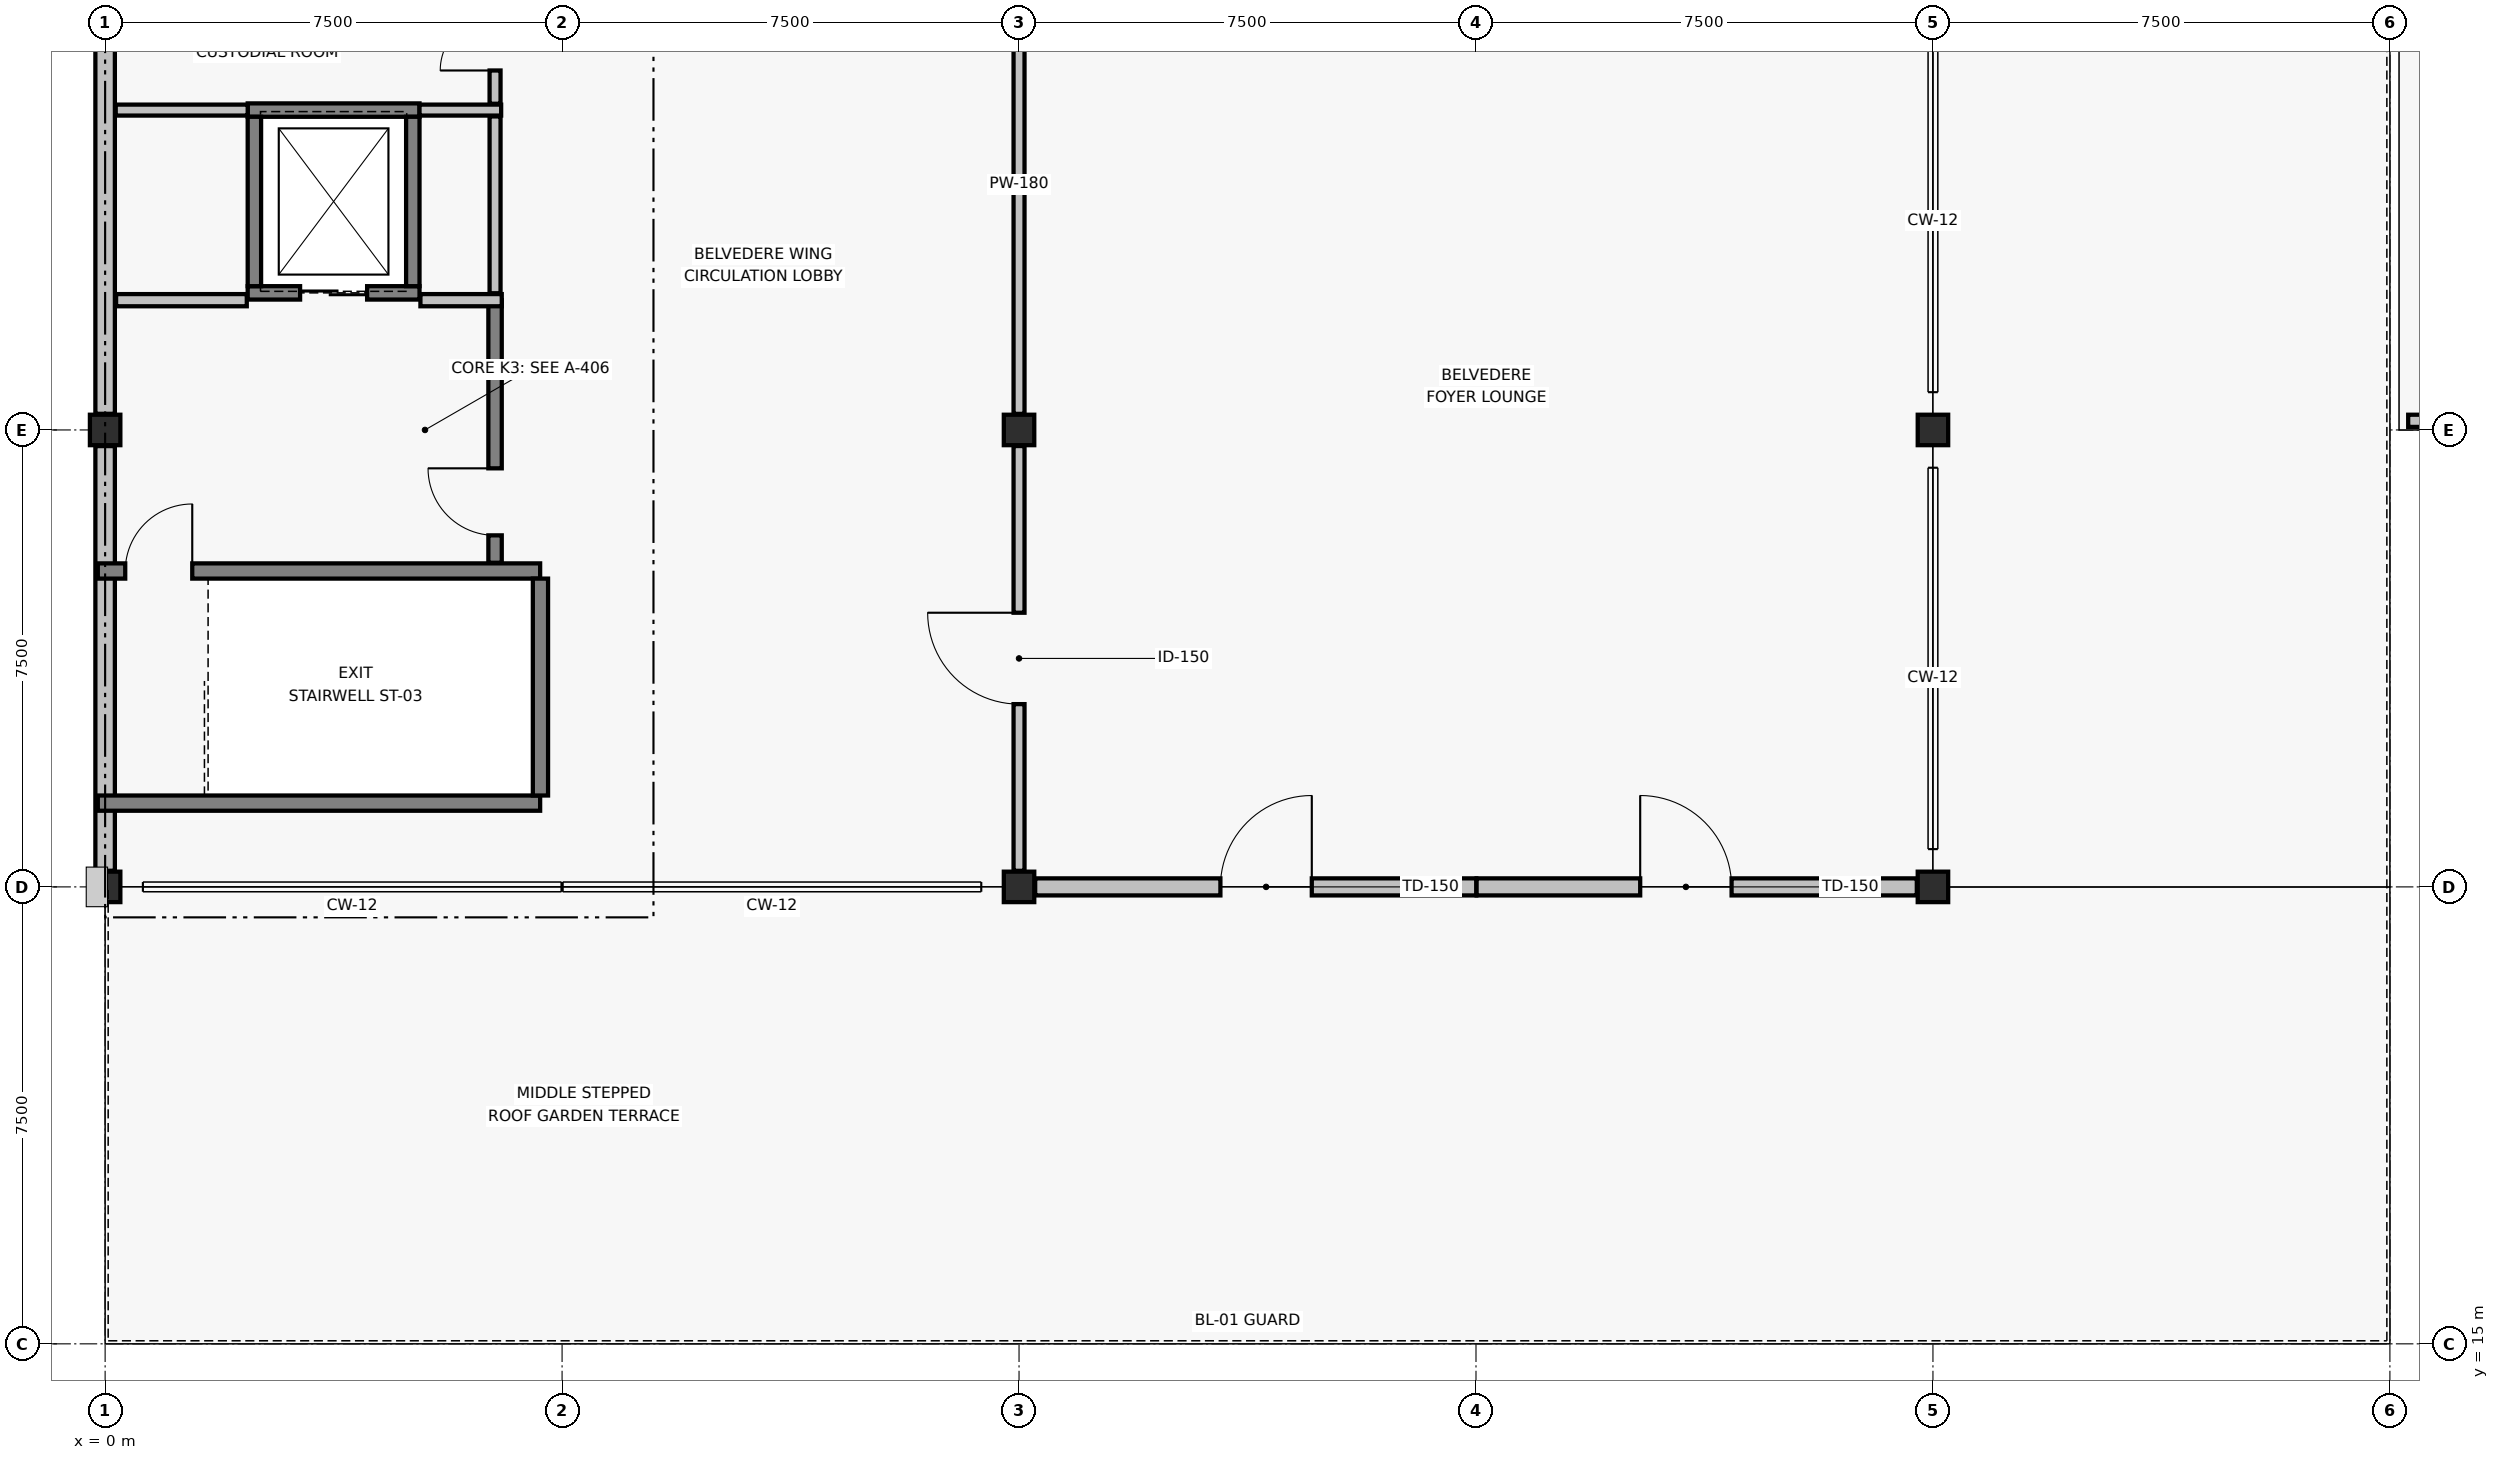
"""IFC4 building model, lengths in metres.
Left out: names, types, materials, properties, quantities, classifications, styles, units other than length and angle.
Written with IfcOpenShell. Run it as: python <this file> out.ifc"""

import sys

from ifc_helpers import new_model, si_unit, direction, frame, frame_2d, origin, origin_2d, place, context, subcontext, project, spatial, rectangle, extrude, element, fill, save


model = new_model("IFC4")
c1 = context("Model", 3, precision=1e-05, world=origin(), true_north=direction((0.0, 1.0)))
c2 = subcontext(c1, "Body", "Model", "MODEL_VIEW")
j1 = project(units=[si_unit("LENGTHUNIT", "METRE"), si_unit("PLANEANGLEUNIT", "RADIAN")], contexts=[c1])
p1 = place(None, origin())
s1 = spatial("IfcSite", under=j1, at=p1, CompositionType="ELEMENT")
p2 = place(p1, origin())
s2 = spatial("IfcBuilding", under=s1, at=p2, CompositionType="ELEMENT")
p3 = place(p2, frame((0.0, 0.0, 17.1)))
s3 = spatial("IfcBuildingStorey", under=s2, at=p3, CompositionType="ELEMENT", Elevation=17.1)
for number, where, z_axis, x_axis in (
    (1, (0.0, 22.5, 0.0), (0.0, 0.0, 1.0), (1.0, 0.0, 0.0)),
    (2, (0.0, 30.0, 0.0), (0.0, 0.0, 1.0), (1.0, 0.0, 0.0)),
    (3, (15.0, 22.5, 0.0), (0.0, 0.0, 1.0), (1.0, 0.0, 0.0)),
    (4, (15.0, 30.0, 0.0), (0.0, 0.0, 1.0), (1.0, 0.0, 0.0)),
    (5, (30.0, 22.5, 0.0), (0.0, 0.0, 1.0), (1.0, 0.0, 0.0)),
    (6, (30.0, 30.0, 0.0), (0.0, 0.0, 1.0), (1.0, 0.0, 0.0)),
):
    element("IfcColumn", number, at=place(p3, frame(where, z_axis=z_axis, x_axis=x_axis)), inside=s3, PredefinedType="COLUMN", context=c2, shape_type="SweptSolid", body=[
        extrude(rectangle(XDim=0.5, YDim=0.5, at=origin_2d()), origin(), (0.0, 0.0, 1.0), 3.9),
    ])
p4 = place(p3, frame((15.265, 22.5, 0.0), z_axis=(0.0, 0.0, 1.0), x_axis=(1.0, 0.0, 0.0)))
e7 = element("IfcWall", 7, at=p4, inside=s3, PredefinedType="SOLIDWALL", context=c2, shape_type="SweptSolid", body=[
    extrude(rectangle(XDim=7.24, YDim=0.28, at=frame_2d((3.62, 0.0))), origin(), (0.0, 0.0, 1.0), 2.59),
])
p5 = place(p4, frame((3.04, 0.0, 0.0)))
e8 = element("IfcOpeningElement", 8, at=p5, cuts=e7, PredefinedType="OPENING", context=c2, shape_type="SweptSolid", body=[
    extrude(rectangle(XDim=1.5, YDim=2.15, at=frame_2d((0.75, 1.075))), frame((0.0, 0.15, 0.0), z_axis=(0.0, -1.0, 0.0), x_axis=(1.0, 0.0, 0.0)), (0.0, 0.0, 1.0), 0.3),
])
p6 = place(p3, frame((22.51, 22.5, 0.0), z_axis=(0.0, 0.0, 1.0), x_axis=(1.0, 0.0, 0.0)))
e9 = element("IfcWall", 9, at=p6, inside=s3, PredefinedType="SOLIDWALL", context=c2, shape_type="SweptSolid", body=[
    extrude(rectangle(XDim=7.225, YDim=0.28, at=frame_2d((3.613, 0.0))), origin(), (0.0, 0.0, 1.0), 2.59),
])
p7 = place(p6, frame((2.685, 0.0, 0.0)))
e10 = element("IfcOpeningElement", 10, at=p7, cuts=e9, PredefinedType="OPENING", context=c2, shape_type="SweptSolid", body=[
    extrude(rectangle(XDim=1.5, YDim=2.15, at=frame_2d((0.75, 1.075))), frame((0.0, 0.15, 0.0), z_axis=(0.0, -1.0, 0.0), x_axis=(1.0, 0.0, 0.0)), (0.0, 0.0, 1.0), 0.3),
])
for number, where, z_axis, x_axis in (
    (11, (0.0, 22.765, 0.0), (0.0, 0.0, 1.0), (0.0, 1.0, 0.0)),
    (12, (0.0, 30.265, 0.0), (0.0, 0.0, 1.0), (0.0, 1.0, 0.0)),
):
    element("IfcWall", number, at=place(p3, frame(where, z_axis=z_axis, x_axis=x_axis)), inside=s3, PredefinedType="SOLIDWALL", context=c2, shape_type="SweptSolid", body=[
        extrude(rectangle(XDim=6.97, YDim=0.32, at=frame_2d((3.485, 0.0))), origin(), (0.0, 0.0, 1.0), 2.59),
    ])
p8 = place(p3, frame((37.8, 30.15, 0.55), z_axis=(0.0, 0.0, 1.0), x_axis=(1.0, 0.0, 0.0)))
e13 = element("IfcWall", 13, at=p8, inside=s3, PredefinedType="PARAPET", context=c2, shape_type="SweptSolid", body=[
    extrude(rectangle(XDim=14.4, YDim=0.2, at=frame_2d((7.2, 0.0))), origin(), (0.0, 0.0, 1.0), 1.12),
])
p9 = place(p3, frame((-0.12, 23.875, 0.0), z_axis=(0.0, 0.0, 1.0), x_axis=(1.0, 0.0, 0.0)))
e14 = element("IfcWall", 14, at=p9, inside=s3, PredefinedType="SOLIDWALL", context=c2, shape_type="SweptSolid", body=[
    extrude(rectangle(XDim=7.26, YDim=0.25, at=frame_2d((3.63, 0.0))), origin(), (0.0, 0.0, 1.0), 3.62),
])
p10 = place(p3, frame((-0.12, 27.685, 0.0), z_axis=(0.0, 0.0, 1.0), x_axis=(1.0, 0.0, 0.0)))
e15 = element("IfcWall", 15, at=p10, inside=s3, PredefinedType="SOLIDWALL", context=c2, shape_type="SweptSolid", body=[
    extrude(rectangle(XDim=7.26, YDim=0.25, at=frame_2d((3.63, 0.0))), origin(), (0.0, 0.0, 1.0), 3.62),
])
p11 = place(p10, frame((0.45, 0.0, 0.0)))
e16 = element("IfcOpeningElement", 16, at=p11, cuts=e15, PredefinedType="OPENING", context=c2, shape_type="SweptSolid", body=[
    extrude(rectangle(XDim=1.1, YDim=2.15, at=frame_2d((0.55, 1.075))), frame((0.0, 0.135, 0.0), z_axis=(0.0, -1.0, 0.0), x_axis=(1.0, 0.0, 0.0)), (0.0, 0.0, 1.0), 0.27),
])
p12 = place(p3, frame((7.145, 24.0, 0.0), z_axis=(0.0, 0.0, 1.0), x_axis=(0.0, 1.0, 0.0)))
e17 = element("IfcWall", 17, at=p12, inside=s3, PredefinedType="SOLIDWALL", context=c2, shape_type="SweptSolid", body=[
    extrude(rectangle(XDim=3.56, YDim=0.25, at=frame_2d((1.78, 0.0))), origin(), (0.0, 0.0, 1.0), 3.62),
])
p13 = place(p3, frame((2.34, 32.25, 0.0), z_axis=(0.0, 0.0, 1.0), x_axis=(1.0, 0.0, 0.0)))
e18 = element("IfcWall", 18, at=p13, inside=s3, PredefinedType="SOLIDWALL", context=c2, shape_type="SweptSolid", body=[
    extrude(rectangle(XDim=2.82, YDim=0.22, at=frame_2d((1.41, 0.0))), origin(), (0.0, 0.0, 1.0), 3.62),
])
p14 = place(p13, frame((0.86, 0.0, 0.0)))
e19 = element("IfcOpeningElement", 19, at=p14, cuts=e18, PredefinedType="OPENING", context=c2, shape_type="SweptSolid", body=[
    extrude(rectangle(XDim=1.1, YDim=2.15, at=frame_2d((0.55, 1.075))), frame((0.0, 0.12, 0.0), z_axis=(0.0, -1.0, 0.0), x_axis=(1.0, 0.0, 0.0)), (0.0, 0.0, 1.0), 0.24),
])
p15 = place(p3, frame((2.34, 35.25, 0.0), z_axis=(0.0, 0.0, 1.0), x_axis=(1.0, 0.0, 0.0)))
e20 = element("IfcWall", 20, at=p15, inside=s3, PredefinedType="SOLIDWALL", context=c2, shape_type="SweptSolid", body=[
    extrude(rectangle(XDim=2.82, YDim=0.22, at=frame_2d((1.41, 0.0))), origin(), (0.0, 0.0, 1.0), 3.62),
])
for number, where, z_axis, x_axis in (
    (21, (2.45, 32.36, 0.0), (0.0, 0.0, 1.0), (0.0, 1.0, 0.0)),
    (22, (5.05, 32.36, 0.0), (0.0, 0.0, 1.0), (0.0, 1.0, 0.0)),
):
    element("IfcWall", number, at=place(p3, frame(where, z_axis=z_axis, x_axis=x_axis)), inside=s3, PredefinedType="SOLIDWALL", context=c2, shape_type="SweptSolid", body=[
        extrude(rectangle(XDim=2.78, YDim=0.22, at=frame_2d((1.39, 0.0))), origin(), (0.0, 0.0, 1.0), 3.62),
    ])
p16 = place(p3, frame((6.4, 27.82, 0.0), z_axis=(0.0, 0.0, 1.0), x_axis=(0.0, 1.0, 0.0)))
e23 = element("IfcWall", 23, at=p16, inside=s3, PredefinedType="SOLIDWALL", context=c2, shape_type="SweptSolid", body=[
    extrude(rectangle(XDim=4.31, YDim=0.22, at=frame_2d((2.155, 0.0))), origin(), (0.0, 0.0, 1.0), 3.62),
])
p17 = place(p16, frame((0.45, 0.0, 0.0)))
e24 = element("IfcOpeningElement", 24, at=p17, cuts=e23, PredefinedType="OPENING", context=c2, shape_type="SweptSolid", body=[
    extrude(rectangle(XDim=1.1, YDim=2.15, at=frame_2d((0.55, 1.075))), frame((0.0, 0.12, 0.0), z_axis=(0.0, -1.0, 0.0), x_axis=(1.0, 0.0, 0.0)), (0.0, 0.0, 1.0), 0.24),
])
p18 = place(p3, frame((0.18, 32.13, 0.0), z_axis=(0.0, 0.0, 1.0), x_axis=(1.0, 0.0, 0.0)))
e25 = element("IfcWall", 25, at=p18, inside=s3, PredefinedType="PARTITIONING", context=c2, shape_type="SweptSolid", body=[
    extrude(rectangle(XDim=2.145, YDim=0.2, at=frame_2d((1.073, 0.0))), origin(), (0.0, 0.0, 1.0), 3.0),
])
p19 = place(p3, frame((5.175, 32.13, 0.0), z_axis=(0.0, 0.0, 1.0), x_axis=(1.0, 0.0, 0.0)))
e26 = element("IfcWall", 26, at=p19, inside=s3, PredefinedType="PARTITIONING", context=c2, shape_type="SweptSolid", body=[
    extrude(rectangle(XDim=1.335, YDim=0.2, at=frame_2d((0.667, 0.0))), origin(), (0.0, 0.0, 1.0), 3.33),
])
p20 = place(p3, frame((0.174, 35.25, 0.0), z_axis=(0.0, 0.0, 1.0), x_axis=(1.0, 0.0, 0.0)))
e27 = element("IfcWall", 27, at=p20, inside=s3, PredefinedType="PARTITIONING", context=c2, shape_type="SweptSolid", body=[
    extrude(rectangle(XDim=2.166, YDim=0.18, at=frame_2d((1.083, 0.0))), origin(), (0.0, 0.0, 1.0), 2.97),
])
p21 = place(p3, frame((5.16, 35.25, 0.0), z_axis=(0.0, 0.0, 1.0), x_axis=(1.0, 0.0, 0.0)))
e28 = element("IfcWall", 28, at=p21, inside=s3, PredefinedType="PARTITIONING", context=c2, shape_type="SweptSolid", body=[
    extrude(rectangle(XDim=1.34, YDim=0.18, at=frame_2d((0.67, 0.0))), origin(), (0.0, 0.0, 1.0), 2.97),
])
p22 = place(p3, frame((6.4, 32.244, 0.0), z_axis=(0.0, 0.0, 1.0), x_axis=(0.0, 1.0, 0.0)))
e29 = element("IfcWall", 29, at=p22, inside=s3, PredefinedType="PARTITIONING", context=c2, shape_type="SweptSolid", body=[
    extrude(rectangle(XDim=2.902, YDim=0.18, at=frame_2d((1.451, 0.0))), origin(), (0.0, 0.0, 1.0), 2.97),
])
p23 = place(p3, frame((6.4, 35.354, 0.0), z_axis=(0.0, 0.0, 1.0), x_axis=(0.0, 1.0, 0.0)))
e30 = element("IfcWall", 30, at=p23, inside=s3, PredefinedType="PARTITIONING", context=c2, shape_type="SweptSolid", body=[
    extrude(rectangle(XDim=2.052, YDim=0.18, at=frame_2d((1.026, 0.0))), origin(), (0.0, 0.0, 1.0), 2.59),
])
p24 = place(p23, frame((0.546, 0.0, 0.0)))
e31 = element("IfcOpeningElement", 31, at=p24, cuts=e30, PredefinedType="OPENING", context=c2, shape_type="SweptSolid", body=[
    extrude(rectangle(XDim=0.9, YDim=2.1, at=frame_2d((0.45, 1.05))), frame((0.0, 0.1, 0.0), z_axis=(0.0, -1.0, 0.0), x_axis=(1.0, 0.0, 0.0)), (0.0, 0.0, 1.0), 0.2),
])
p25 = place(p3, frame((15.0, 22.764, 0.0), z_axis=(0.0, 0.0, 1.0), x_axis=(0.0, 1.0, 0.0)))
e32 = element("IfcWall", 32, at=p25, inside=s3, PredefinedType="PARTITIONING", context=c2, shape_type="SweptSolid", body=[
    extrude(rectangle(XDim=6.972, YDim=0.18, at=frame_2d((3.486, 0.0))), origin(), (0.0, 0.0, 1.0), 2.59),
])
p26 = place(p25, frame((2.736, 0.0, 0.0)))
e33 = element("IfcOpeningElement", 33, at=p26, cuts=e32, PredefinedType="OPENING", context=c2, shape_type="SweptSolid", body=[
    extrude(rectangle(XDim=1.5, YDim=2.16, at=frame_2d((0.75, 1.08))), frame((0.0, 0.1, 0.0), z_axis=(0.0, -1.0, 0.0), x_axis=(1.0, 0.0, 0.0)), (0.0, 0.0, 1.0), 0.2),
])
p27 = place(p3, frame((15.0, 30.264, 0.0), z_axis=(0.0, 0.0, 1.0), x_axis=(0.0, 1.0, 0.0)))
e34 = element("IfcWall", 34, at=p27, inside=s3, PredefinedType="PARTITIONING", context=c2, shape_type="SweptSolid", body=[
    extrude(rectangle(XDim=6.972, YDim=0.18, at=frame_2d((3.486, 0.0))), origin(), (0.0, 0.0, 1.0), 2.59),
])
p28 = place(p5, frame((1.5, 0.0, 0.0), z_axis=(0.0, 0.0, 1.0), x_axis=(-1.0, 0.0, 0.0)))
e35 = element("IfcDoor", 35, at=p28, inside=s3, OperationType="SINGLE_SWING_LEFT", PredefinedType="DOOR", context=c2, shape_type="SweptSolid", body=[
    extrude(rectangle(XDim=1.5, YDim=2.15, at=frame_2d((0.75, 1.075))), frame((0.0, 0.025, 0.0), z_axis=(0.0, -1.0, 0.0), x_axis=(1.0, 0.0, 0.0)), (0.0, 0.0, 1.0), 0.05),
])
fill(e8, e35)
p29 = place(p7, frame((1.5, 0.0, 0.0), z_axis=(0.0, 0.0, 1.0), x_axis=(-1.0, 0.0, 0.0)))
e36 = element("IfcDoor", 36, at=p29, inside=s3, OperationType="SINGLE_SWING_RIGHT", PredefinedType="DOOR", context=c2, shape_type="SweptSolid", body=[
    extrude(rectangle(XDim=1.5, YDim=2.15, at=frame_2d((0.75, 1.075))), frame((0.0, 0.025, 0.0), z_axis=(0.0, -1.0, 0.0), x_axis=(1.0, 0.0, 0.0)), (0.0, 0.0, 1.0), 0.05),
])
fill(e10, e36)
p30 = place(p11, origin())
e37 = element("IfcDoor", 37, at=p30, inside=s3, OperationType="SINGLE_SWING_RIGHT", PredefinedType="DOOR", context=c2, shape_type="SweptSolid", body=[
    extrude(rectangle(XDim=1.1, YDim=2.15, at=frame_2d((0.55, 1.075))), frame((0.0, 0.025, 0.0), z_axis=(0.0, -1.0, 0.0), x_axis=(1.0, 0.0, 0.0)), (0.0, 0.0, 1.0), 0.05),
])
fill(e16, e37)
p31 = place(p14, origin())
e38 = element("IfcDoor", 38, at=p31, inside=s3, OperationType="SLIDING_TO_LEFT", PredefinedType="DOOR", context=c2, shape_type="SweptSolid", body=[
    extrude(rectangle(XDim=1.1, YDim=2.15, at=frame_2d((0.55, 1.075))), frame((0.0, 0.025, 0.0), z_axis=(0.0, -1.0, 0.0), x_axis=(1.0, 0.0, 0.0)), (0.0, 0.0, 1.0), 0.05),
])
fill(e19, e38)
p32 = place(p17, origin())
e39 = element("IfcDoor", 39, at=p32, inside=s3, OperationType="SINGLE_SWING_RIGHT", PredefinedType="DOOR", context=c2, shape_type="SweptSolid", body=[
    extrude(rectangle(XDim=1.1, YDim=2.15, at=frame_2d((0.55, 1.075))), frame((0.0, 0.025, 0.0), z_axis=(0.0, -1.0, 0.0), x_axis=(1.0, 0.0, 0.0)), (0.0, 0.0, 1.0), 0.05),
])
fill(e24, e39)
p33 = place(p24, origin())
e40 = element("IfcDoor", 40, at=p33, inside=s3, OperationType="SINGLE_SWING_LEFT", PredefinedType="DOOR", context=c2, shape_type="SweptSolid", body=[
    extrude(rectangle(XDim=0.9, YDim=2.1, at=frame_2d((0.45, 1.05))), frame((0.0, 0.025, 0.0), z_axis=(0.0, -1.0, 0.0), x_axis=(1.0, 0.0, 0.0)), (0.0, 0.0, 1.0), 0.05),
])
fill(e31, e40)
p34 = place(p26, origin())
e41 = element("IfcDoor", 41, at=p34, inside=s3, OperationType="SINGLE_SWING_RIGHT", PredefinedType="DOOR", context=c2, shape_type="SweptSolid", body=[
    extrude(rectangle(XDim=1.5, YDim=2.16, at=frame_2d((0.75, 1.08))), frame((0.0, 0.025, 0.0), z_axis=(0.0, -1.0, 0.0), x_axis=(1.0, 0.0, 0.0)), (0.0, 0.0, 1.0), 0.05),
])
fill(e33, e41)
save(model, sys.argv[1])
